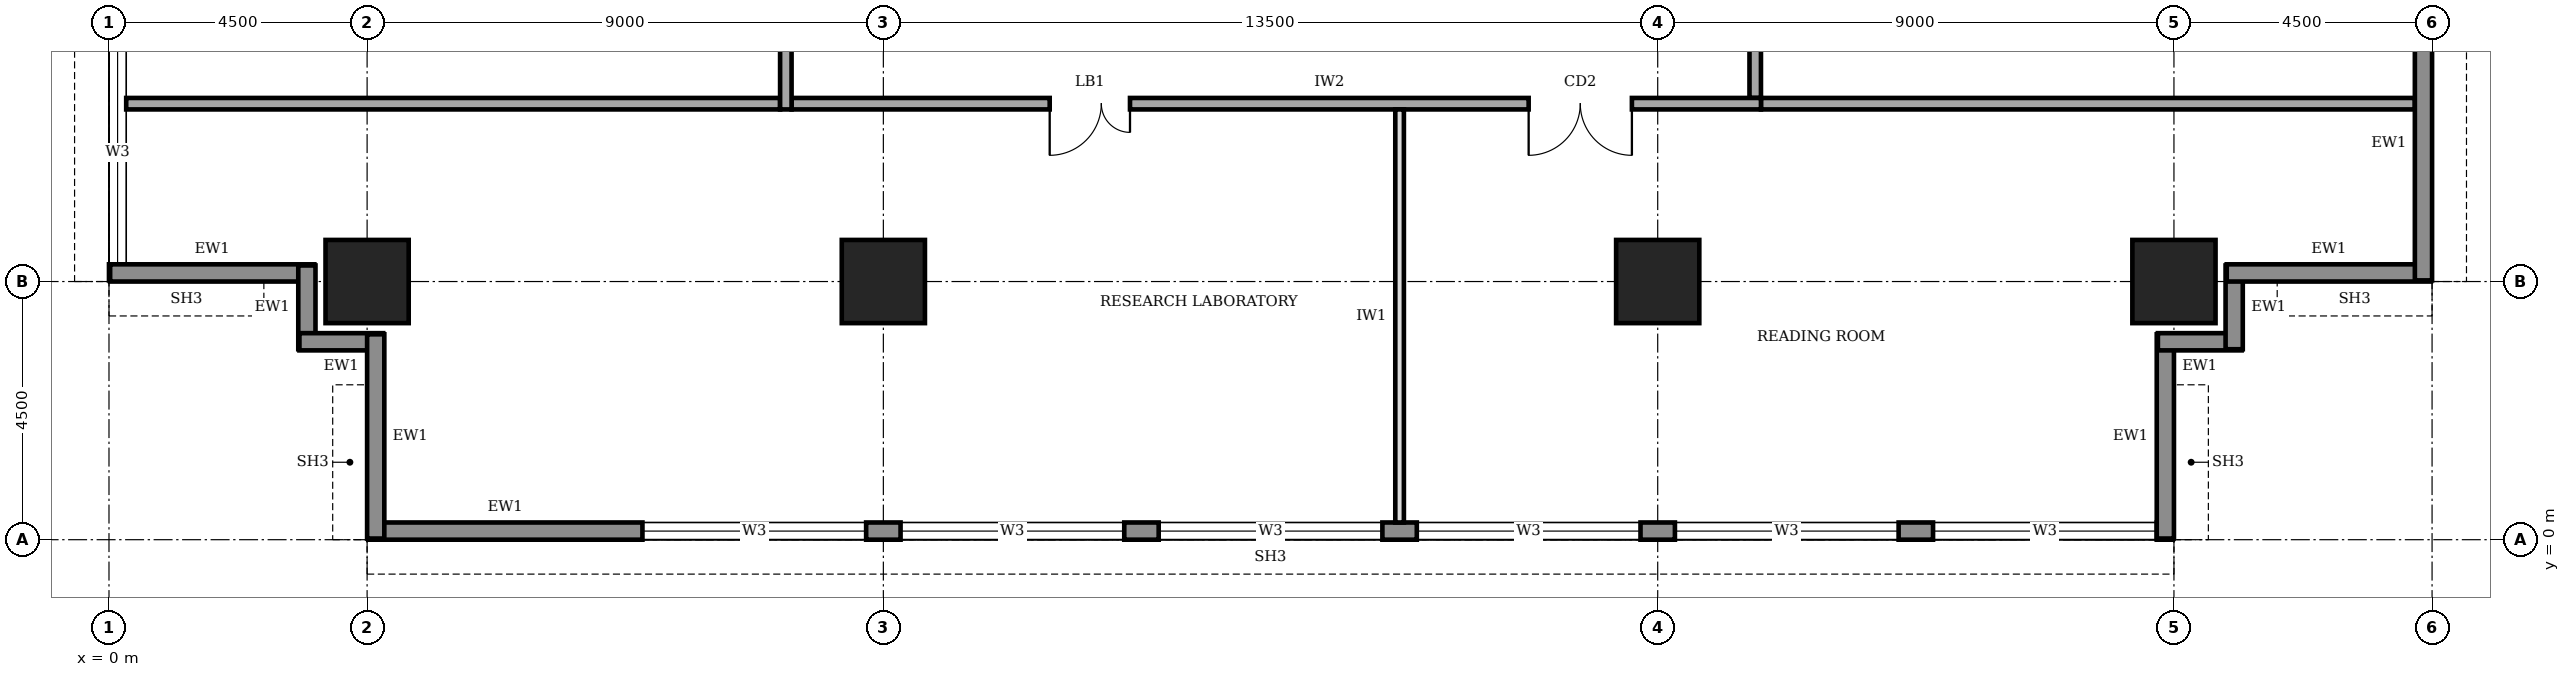
"""IFC4 building model, lengths in metres.
Left out: names, types, materials, properties, quantities, classifications, styles, units other than length and angle.
Written with IfcOpenShell. Run it as: python <this file> out.ifc"""

import sys

from ifc_helpers import new_model, si_unit, direction, frame, frame_2d, origin, origin_2d, place, context, subcontext, project, spatial, rectangle, extrude, element, fill, save


model = new_model("IFC4")
c1 = context("Model", 3, precision=1e-05, world=origin(), true_north=direction((0.0, 1.0)))
c2 = subcontext(c1, "Body", "Model", "MODEL_VIEW")
j1 = project(units=[si_unit("LENGTHUNIT", "METRE"), si_unit("PLANEANGLEUNIT", "RADIAN")], contexts=[c1])
p1 = place(None, origin())
s1 = spatial("IfcSite", under=j1, at=p1, CompositionType="ELEMENT")
p2 = place(p1, origin())
s2 = spatial("IfcBuilding", under=s1, at=p2, CompositionType="ELEMENT")
p3 = place(p2, frame((0.0, 0.0, 265.0)))
s3 = spatial("IfcBuildingStorey", under=s2, at=p3, CompositionType="ELEMENT", Elevation=265.0)
for number, where, z_axis, x_axis in (
    (1, (4.5, 4.5, 0.0), (0.0, 0.0, 1.0), (1.0, 0.0, 0.0)),
    (2, (13.5, 4.5, 0.0), (0.0, 0.0, 1.0), (1.0, 0.0, 0.0)),
    (3, (27.0, 4.5, 0.0), (0.0, 0.0, 1.0), (1.0, 0.0, 0.0)),
    (4, (36.0, 4.5, 0.0), (0.0, 0.0, 1.0), (1.0, 0.0, 0.0)),
):
    element("IfcColumn", number, at=place(p3, frame(where, z_axis=z_axis, x_axis=x_axis)), inside=s3, PredefinedType="COLUMN", context=c2, shape_type="SweptSolid", body=[
        extrude(rectangle(XDim=1.45, YDim=1.45, at=origin_2d()), origin(), (0.0, 0.0, 1.0), 4.0),
    ])
p4 = place(p3, frame((4.52, 0.15, 0.0), z_axis=(0.0, 0.0, 1.0), x_axis=(1.0, 0.0, 0.0)))
e5 = element("IfcWall", 5, at=p4, inside=s3, PredefinedType="STANDARD", context=c2, shape_type="SweptSolid", body=[
    extrude(rectangle(XDim=31.46, YDim=0.3, at=frame_2d((15.73, 0.0))), origin(), (0.0, 0.0, 1.0), 3.75),
])
p5 = place(p4, frame((4.78, 0.0, 0.95)))
e6 = element("IfcOpeningElement", 6, at=p5, cuts=e5, PredefinedType="OPENING", context=c2, shape_type="SweptSolid", body=[
    extrude(rectangle(XDim=3.9, YDim=1.8, at=frame_2d((1.95, 0.9))), frame((0.0, 0.16, 0.0), z_axis=(0.0, -1.0, 0.0), x_axis=(1.0, 0.0, 0.0)), (0.0, 0.0, 1.0), 0.32),
])
p6 = place(p4, frame((9.28, 0.0, 0.95)))
e7 = element("IfcOpeningElement", 7, at=p6, cuts=e5, PredefinedType="OPENING", context=c2, shape_type="SweptSolid", body=[
    extrude(rectangle(XDim=3.9, YDim=1.8, at=frame_2d((1.95, 0.9))), frame((0.0, 0.16, 0.0), z_axis=(0.0, -1.0, 0.0), x_axis=(1.0, 0.0, 0.0)), (0.0, 0.0, 1.0), 0.32),
])
p7 = place(p4, frame((13.78, 0.0, 0.95)))
e8 = element("IfcOpeningElement", 8, at=p7, cuts=e5, PredefinedType="OPENING", context=c2, shape_type="SweptSolid", body=[
    extrude(rectangle(XDim=3.9, YDim=1.8, at=frame_2d((1.95, 0.9))), frame((0.0, 0.16, 0.0), z_axis=(0.0, -1.0, 0.0), x_axis=(1.0, 0.0, 0.0)), (0.0, 0.0, 1.0), 0.32),
])
p8 = place(p4, frame((18.28, 0.0, 0.95)))
e9 = element("IfcOpeningElement", 9, at=p8, cuts=e5, PredefinedType="OPENING", context=c2, shape_type="SweptSolid", body=[
    extrude(rectangle(XDim=3.9, YDim=1.8, at=frame_2d((1.95, 0.9))), frame((0.0, 0.16, 0.0), z_axis=(0.0, -1.0, 0.0), x_axis=(1.0, 0.0, 0.0)), (0.0, 0.0, 1.0), 0.32),
])
p9 = place(p4, frame((22.78, 0.0, 0.95)))
e10 = element("IfcOpeningElement", 10, at=p9, cuts=e5, PredefinedType="OPENING", context=c2, shape_type="SweptSolid", body=[
    extrude(rectangle(XDim=3.9, YDim=1.8, at=frame_2d((1.95, 0.9))), frame((0.0, 0.16, 0.0), z_axis=(0.0, -1.0, 0.0), x_axis=(1.0, 0.0, 0.0)), (0.0, 0.0, 1.0), 0.32),
])
p10 = place(p4, frame((27.28, 0.0, 0.95)))
e11 = element("IfcOpeningElement", 11, at=p10, cuts=e5, PredefinedType="OPENING", context=c2, shape_type="SweptSolid", body=[
    extrude(rectangle(XDim=3.9, YDim=1.8, at=frame_2d((1.95, 0.9))), frame((0.0, 0.16, 0.0), z_axis=(0.0, -1.0, 0.0), x_axis=(1.0, 0.0, 0.0)), (0.0, 0.0, 1.0), 0.32),
])
p11 = place(p3, frame((35.85, 0.02, 0.0), z_axis=(0.0, 0.0, 1.0), x_axis=(0.0, 1.0, 0.0)))
e12 = element("IfcWall", 12, at=p11, inside=s3, PredefinedType="STANDARD", context=c2, shape_type="SweptSolid", body=[
    extrude(rectangle(XDim=3.56, YDim=0.3, at=frame_2d((1.78, 0.0))), origin(), (0.0, 0.0, 1.0), 2.85),
])
for number, where, z_axis, x_axis in (
    (13, (35.72, 3.45, 0.0), (0.0, 0.0, 1.0), (1.0, 0.0, 0.0)),
    (14, (37.05, 3.32, 0.0), (0.0, 0.0, 1.0), (0.0, 1.0, 0.0)),
):
    element("IfcWall", number, at=place(p3, frame(where, z_axis=z_axis, x_axis=x_axis)), inside=s3, PredefinedType="STANDARD", context=c2, shape_type="SweptSolid", body=[
        extrude(rectangle(XDim=1.46, YDim=0.3, at=frame_2d((0.73, 0.0))), origin(), (0.0, 0.0, 1.0), 3.75),
    ])
p12 = place(p3, frame((36.92, 4.65, 0.0), z_axis=(0.0, 0.0, 1.0), x_axis=(1.0, 0.0, 0.0)))
e15 = element("IfcWall", 15, at=p12, inside=s3, PredefinedType="STANDARD", context=c2, shape_type="SweptSolid", body=[
    extrude(rectangle(XDim=3.56, YDim=0.3, at=frame_2d((1.78, 0.0))), origin(), (0.0, 0.0, 1.0), 2.85),
])
p13 = place(p3, frame((40.35, 4.52, 0.0), z_axis=(0.0, 0.0, 1.0), x_axis=(0.0, 1.0, 0.0)))
e16 = element("IfcWall", 16, at=p13, inside=s3, PredefinedType="STANDARD", context=c2, shape_type="SweptSolid", body=[
    extrude(rectangle(XDim=31.46, YDim=0.3, at=frame_2d((15.73, 0.0))), origin(), (0.0, 0.0, 1.0), 3.75),
])
p14 = place(p13, frame((4.78, 0.0, 0.95)))
e17 = element("IfcOpeningElement", 17, at=p14, cuts=e16, PredefinedType="OPENING", context=c2, shape_type="SweptSolid", body=[
    extrude(rectangle(XDim=3.9, YDim=1.8, at=frame_2d((1.95, 0.9))), frame((0.0, 0.16, 0.0), z_axis=(0.0, -1.0, 0.0), x_axis=(1.0, 0.0, 0.0)), (0.0, 0.0, 1.0), 0.32),
])
p15 = place(p13, frame((9.28, 0.0, 0.95)))
e18 = element("IfcOpeningElement", 18, at=p15, cuts=e16, PredefinedType="OPENING", context=c2, shape_type="SweptSolid", body=[
    extrude(rectangle(XDim=3.9, YDim=1.8, at=frame_2d((1.95, 0.9))), frame((0.0, 0.16, 0.0), z_axis=(0.0, -1.0, 0.0), x_axis=(1.0, 0.0, 0.0)), (0.0, 0.0, 1.0), 0.32),
])
p16 = place(p13, frame((13.78, 0.0, 0.95)))
e19 = element("IfcOpeningElement", 19, at=p16, cuts=e16, PredefinedType="OPENING", context=c2, shape_type="SweptSolid", body=[
    extrude(rectangle(XDim=3.9, YDim=1.8, at=frame_2d((1.95, 0.9))), frame((0.0, 0.16, 0.0), z_axis=(0.0, -1.0, 0.0), x_axis=(1.0, 0.0, 0.0)), (0.0, 0.0, 1.0), 0.32),
])
p17 = place(p13, frame((18.28, 0.0, 0.95)))
e20 = element("IfcOpeningElement", 20, at=p17, cuts=e16, PredefinedType="OPENING", context=c2, shape_type="SweptSolid", body=[
    extrude(rectangle(XDim=3.9, YDim=1.8, at=frame_2d((1.95, 0.9))), frame((0.0, 0.16, 0.0), z_axis=(0.0, -1.0, 0.0), x_axis=(1.0, 0.0, 0.0)), (0.0, 0.0, 1.0), 0.32),
])
p18 = place(p13, frame((22.78, 0.0, 0.95)))
e21 = element("IfcOpeningElement", 21, at=p18, cuts=e16, PredefinedType="OPENING", context=c2, shape_type="SweptSolid", body=[
    extrude(rectangle(XDim=3.9, YDim=1.8, at=frame_2d((1.95, 0.9))), frame((0.0, 0.16, 0.0), z_axis=(0.0, -1.0, 0.0), x_axis=(1.0, 0.0, 0.0)), (0.0, 0.0, 1.0), 0.32),
])
p19 = place(p13, frame((27.28, 0.0, 0.95)))
e22 = element("IfcOpeningElement", 22, at=p19, cuts=e16, PredefinedType="OPENING", context=c2, shape_type="SweptSolid", body=[
    extrude(rectangle(XDim=3.9, YDim=1.8, at=frame_2d((1.95, 0.9))), frame((0.0, 0.16, 0.0), z_axis=(0.0, -1.0, 0.0), x_axis=(1.0, 0.0, 0.0)), (0.0, 0.0, 1.0), 0.32),
])
p20 = place(p3, frame((0.15, 35.98, 0.0), z_axis=(0.0, 0.0, 1.0), x_axis=(0.0, -1.0, 0.0)))
e23 = element("IfcWall", 23, at=p20, inside=s3, PredefinedType="STANDARD", context=c2, shape_type="SweptSolid", body=[
    extrude(rectangle(XDim=31.46, YDim=0.3, at=frame_2d((15.73, 0.0))), origin(), (0.0, 0.0, 1.0), 3.75),
])
p21 = place(p20, frame((27.28, 0.0, 0.95)))
e24 = element("IfcOpeningElement", 24, at=p21, cuts=e23, PredefinedType="OPENING", context=c2, shape_type="SweptSolid", body=[
    extrude(rectangle(XDim=3.9, YDim=1.8, at=frame_2d((1.95, 0.9))), frame((0.0, 0.16, 0.0), z_axis=(0.0, -1.0, 0.0), x_axis=(1.0, 0.0, 0.0)), (0.0, 0.0, 1.0), 0.32),
])
p22 = place(p20, frame((22.78, 0.0, 0.95)))
e25 = element("IfcOpeningElement", 25, at=p22, cuts=e23, PredefinedType="OPENING", context=c2, shape_type="SweptSolid", body=[
    extrude(rectangle(XDim=3.9, YDim=1.8, at=frame_2d((1.95, 0.9))), frame((0.0, 0.16, 0.0), z_axis=(0.0, -1.0, 0.0), x_axis=(1.0, 0.0, 0.0)), (0.0, 0.0, 1.0), 0.32),
])
p23 = place(p20, frame((18.28, 0.0, 0.95)))
e26 = element("IfcOpeningElement", 26, at=p23, cuts=e23, PredefinedType="OPENING", context=c2, shape_type="SweptSolid", body=[
    extrude(rectangle(XDim=3.9, YDim=1.8, at=frame_2d((1.95, 0.9))), frame((0.0, 0.16, 0.0), z_axis=(0.0, -1.0, 0.0), x_axis=(1.0, 0.0, 0.0)), (0.0, 0.0, 1.0), 0.32),
])
p24 = place(p20, frame((13.78, 0.0, 0.95)))
e27 = element("IfcOpeningElement", 27, at=p24, cuts=e23, PredefinedType="OPENING", context=c2, shape_type="SweptSolid", body=[
    extrude(rectangle(XDim=3.9, YDim=1.8, at=frame_2d((1.95, 0.9))), frame((0.0, 0.16, 0.0), z_axis=(0.0, -1.0, 0.0), x_axis=(1.0, 0.0, 0.0)), (0.0, 0.0, 1.0), 0.32),
])
p25 = place(p20, frame((9.28, 0.0, 0.95)))
e28 = element("IfcOpeningElement", 28, at=p25, cuts=e23, PredefinedType="OPENING", context=c2, shape_type="SweptSolid", body=[
    extrude(rectangle(XDim=3.9, YDim=1.8, at=frame_2d((1.95, 0.9))), frame((0.0, 0.16, 0.0), z_axis=(0.0, -1.0, 0.0), x_axis=(1.0, 0.0, 0.0)), (0.0, 0.0, 1.0), 0.32),
])
p26 = place(p20, frame((4.78, 0.0, 0.95)))
e29 = element("IfcOpeningElement", 29, at=p26, cuts=e23, PredefinedType="OPENING", context=c2, shape_type="SweptSolid", body=[
    extrude(rectangle(XDim=3.9, YDim=1.8, at=frame_2d((1.95, 0.9))), frame((0.0, 0.16, 0.0), z_axis=(0.0, -1.0, 0.0), x_axis=(1.0, 0.0, 0.0)), (0.0, 0.0, 1.0), 0.32),
])
p27 = place(p3, frame((0.02, 4.65, 0.0), z_axis=(0.0, 0.0, 1.0), x_axis=(1.0, 0.0, 0.0)))
e30 = element("IfcWall", 30, at=p27, inside=s3, PredefinedType="STANDARD", context=c2, shape_type="SweptSolid", body=[
    extrude(rectangle(XDim=3.56, YDim=0.3, at=frame_2d((1.78, 0.0))), origin(), (0.0, 0.0, 1.0), 2.85),
])
for number, where, z_axis, x_axis in (
    (31, (3.45, 4.78, 0.0), (0.0, 0.0, 1.0), (0.0, -1.0, 0.0)),
    (32, (3.32, 3.45, 0.0), (0.0, 0.0, 1.0), (1.0, 0.0, 0.0)),
):
    element("IfcWall", number, at=place(p3, frame(where, z_axis=z_axis, x_axis=x_axis)), inside=s3, PredefinedType="STANDARD", context=c2, shape_type="SweptSolid", body=[
        extrude(rectangle(XDim=1.46, YDim=0.3, at=frame_2d((0.73, 0.0))), origin(), (0.0, 0.0, 1.0), 3.75),
    ])
p28 = place(p3, frame((4.65, 3.58, 0.0), z_axis=(0.0, 0.0, 1.0), x_axis=(0.0, -1.0, 0.0)))
e33 = element("IfcWall", 33, at=p28, inside=s3, PredefinedType="STANDARD", context=c2, shape_type="SweptSolid", body=[
    extrude(rectangle(XDim=3.56, YDim=0.3, at=frame_2d((1.78, 0.0))), origin(), (0.0, 0.0, 1.0), 2.85),
])
p29 = place(p3, frame((11.9, 7.6, 0.0), z_axis=(0.0, 0.0, 1.0), x_axis=(1.0, 0.0, 0.0)))
e34 = element("IfcWall", 34, at=p29, inside=s3, PredefinedType="SOLIDWALL", context=c2, shape_type="SweptSolid", body=[
    extrude(rectangle(XDim=16.9, YDim=0.2, at=frame_2d((8.45, 0.0))), origin(), (0.0, 0.0, 1.0), 3.75),
])
p30 = place(p29, frame((4.5, 0.0, 0.0)))
e35 = element("IfcOpeningElement", 35, at=p30, cuts=e34, PredefinedType="OPENING", context=c2, shape_type="SweptSolid", body=[
    extrude(rectangle(XDim=1.4, YDim=2.1, at=frame_2d((0.7, 1.05))), frame((0.0, 0.11, 0.0), z_axis=(0.0, -1.0, 0.0), x_axis=(1.0, 0.0, 0.0)), (0.0, 0.0, 1.0), 0.22),
])
p31 = place(p29, frame((12.85, 0.0, 0.0)))
e36 = element("IfcOpeningElement", 36, at=p31, cuts=e34, PredefinedType="OPENING", context=c2, shape_type="SweptSolid", body=[
    extrude(rectangle(XDim=1.8, YDim=2.1, at=frame_2d((0.9, 1.05))), frame((0.0, 0.11, 0.0), z_axis=(0.0, -1.0, 0.0), x_axis=(1.0, 0.0, 0.0)), (0.0, 0.0, 1.0), 0.22),
])
p32 = place(p3, frame((28.7, 7.7, 0.0), z_axis=(0.0, 0.0, 1.0), x_axis=(0.0, 1.0, 0.0)))
e37 = element("IfcWall", 37, at=p32, inside=s3, PredefinedType="SOLIDWALL", context=c2, shape_type="SweptSolid", body=[
    extrude(rectangle(XDim=23.8, YDim=0.2, at=frame_2d((11.9, 0.0))), origin(), (0.0, 0.0, 1.0), 3.75),
])
p33 = place(p32, frame((4.15, 0.0, 0.0)))
e38 = element("IfcOpeningElement", 38, at=p33, cuts=e37, PredefinedType="OPENING", context=c2, shape_type="SweptSolid", body=[
    extrude(rectangle(XDim=1.8, YDim=2.1, at=frame_2d((0.9, 1.05))), frame((0.0, 0.11, 0.0), z_axis=(0.0, -1.0, 0.0), x_axis=(1.0, 0.0, 0.0)), (0.0, 0.0, 1.0), 0.22),
])
p34 = place(p32, frame((16.35, 0.0, 0.0)))
e39 = element("IfcOpeningElement", 39, at=p34, cuts=e37, PredefinedType="OPENING", context=c2, shape_type="SweptSolid", body=[
    extrude(rectangle(XDim=1.4, YDim=2.1, at=frame_2d((0.7, 1.05))), frame((0.0, 0.11, 0.0), z_axis=(0.0, -1.0, 0.0), x_axis=(1.0, 0.0, 0.0)), (0.0, 0.0, 1.0), 0.22),
])
p35 = place(p3, frame((11.8, 31.3, 0.0), z_axis=(0.0, 0.0, 1.0), x_axis=(0.0, -1.0, 0.0)))
e40 = element("IfcWall", 40, at=p35, inside=s3, PredefinedType="SOLIDWALL", context=c2, shape_type="SweptSolid", body=[
    extrude(rectangle(XDim=23.8, YDim=0.2, at=frame_2d((11.9, 0.0))), origin(), (0.0, 0.0, 1.0), 3.75),
])
p36 = place(p35, frame((20.3, 0.0, 0.0)))
e41 = element("IfcOpeningElement", 41, at=p36, cuts=e40, PredefinedType="OPENING", context=c2, shape_type="SweptSolid", body=[
    extrude(rectangle(XDim=1.0, YDim=2.1, at=frame_2d((0.5, 1.05))), frame((0.0, 0.11, 0.0), z_axis=(0.0, -1.0, 0.0), x_axis=(1.0, 0.0, 0.0)), (0.0, 0.0, 1.0), 0.22),
])
p37 = place(p35, frame((16.2, 0.0, 0.0)))
e42 = element("IfcOpeningElement", 42, at=p37, cuts=e40, PredefinedType="OPENING", context=c2, shape_type="SweptSolid", body=[
    extrude(rectangle(XDim=1.0, YDim=2.1, at=frame_2d((0.5, 1.05))), frame((0.0, 0.11, 0.0), z_axis=(0.0, -1.0, 0.0), x_axis=(1.0, 0.0, 0.0)), (0.0, 0.0, 1.0), 0.22),
])
p38 = place(p35, frame((13.2, 0.0, 0.0)))
e43 = element("IfcOpeningElement", 43, at=p38, cuts=e40, PredefinedType="OPENING", context=c2, shape_type="SweptSolid", body=[
    extrude(rectangle(XDim=0.9, YDim=2.1, at=frame_2d((0.45, 1.05))), frame((0.0, 0.11, 0.0), z_axis=(0.0, -1.0, 0.0), x_axis=(1.0, 0.0, 0.0)), (0.0, 0.0, 1.0), 0.22),
])
p39 = place(p35, frame((10.15, 0.0, 0.0)))
e44 = element("IfcOpeningElement", 44, at=p39, cuts=e40, PredefinedType="OPENING", context=c2, shape_type="SweptSolid", body=[
    extrude(rectangle(XDim=0.9, YDim=2.1, at=frame_2d((0.45, 1.05))), frame((0.0, 0.11, 0.0), z_axis=(0.0, -1.0, 0.0), x_axis=(1.0, 0.0, 0.0)), (0.0, 0.0, 1.0), 0.22),
])
p40 = place(p35, frame((5.45, 0.0, 0.0)))
e45 = element("IfcOpeningElement", 45, at=p40, cuts=e40, PredefinedType="OPENING", context=c2, shape_type="SweptSolid", body=[
    extrude(rectangle(XDim=0.9, YDim=2.1, at=frame_2d((0.45, 1.05))), frame((0.0, 0.11, 0.0), z_axis=(0.0, -1.0, 0.0), x_axis=(1.0, 0.0, 0.0)), (0.0, 0.0, 1.0), 0.22),
])
p41 = place(p35, frame((8.0, 0.0, 0.0)))
e46 = element("IfcOpeningElement", 46, at=p41, cuts=e40, PredefinedType="OPENING", context=c2, shape_type="SweptSolid", body=[
    extrude(rectangle(XDim=1.0, YDim=2.1, at=frame_2d((0.5, 1.05))), frame((0.0, 0.11, 0.0), z_axis=(0.0, -1.0, 0.0), x_axis=(1.0, 0.0, 0.0)), (0.0, 0.0, 1.0), 0.22),
])
p42 = place(p35, frame((1.55, 0.0, 0.0)))
e47 = element("IfcOpeningElement", 47, at=p42, cuts=e40, PredefinedType="OPENING", context=c2, shape_type="SweptSolid", body=[
    extrude(rectangle(XDim=1.0, YDim=2.1, at=frame_2d((0.5, 1.05))), frame((0.0, 0.11, 0.0), z_axis=(0.0, -1.0, 0.0), x_axis=(1.0, 0.0, 0.0)), (0.0, 0.0, 1.0), 0.22),
])
for number, where, z_axis, x_axis in (
    (48, (0.3, 7.6, 0.0), (0.0, 0.0, 1.0), (1.0, 0.0, 0.0)),
    (49, (28.8, 7.6, 0.0), (0.0, 0.0, 1.0), (1.0, 0.0, 0.0)),
):
    element("IfcWall", number, at=place(p3, frame(where, z_axis=z_axis, x_axis=x_axis)), inside=s3, PredefinedType="SOLIDWALL", context=c2, shape_type="SweptSolid", body=[
        extrude(rectangle(XDim=11.4, YDim=0.2, at=frame_2d((5.7, 0.0))), origin(), (0.0, 0.0, 1.0), 3.75),
    ])
p43 = place(p3, frame((22.5, 0.3, 0.0), z_axis=(0.0, 0.0, 1.0), x_axis=(0.0, 1.0, 0.0)))
e50 = element("IfcWall", 50, at=p43, inside=s3, PredefinedType="PARTITIONING", context=c2, shape_type="SweptSolid", body=[
    extrude(rectangle(XDim=7.2, YDim=0.15, at=frame_2d((3.6, 0.0))), origin(), (0.0, 0.0, 1.0), 3.75),
])
p44 = place(p5, origin())
e51 = element("IfcWindow", 51, at=p44, inside=s3, PartitioningType="SINGLE_PANEL", PredefinedType="WINDOW", context=c2, shape_type="SweptSolid", body=[
    extrude(rectangle(XDim=3.9, YDim=1.8, at=frame_2d((1.95, 0.9))), frame((0.0, 0.03, 0.0), z_axis=(0.0, -1.0, 0.0), x_axis=(1.0, 0.0, 0.0)), (0.0, 0.0, 1.0), 0.06),
])
fill(e6, e51)
p45 = place(p6, origin())
e52 = element("IfcWindow", 52, at=p45, inside=s3, PartitioningType="SINGLE_PANEL", PredefinedType="WINDOW", context=c2, shape_type="SweptSolid", body=[
    extrude(rectangle(XDim=3.9, YDim=1.8, at=frame_2d((1.95, 0.9))), frame((0.0, 0.03, 0.0), z_axis=(0.0, -1.0, 0.0), x_axis=(1.0, 0.0, 0.0)), (0.0, 0.0, 1.0), 0.06),
])
fill(e7, e52)
p46 = place(p7, origin())
e53 = element("IfcWindow", 53, at=p46, inside=s3, PartitioningType="SINGLE_PANEL", PredefinedType="WINDOW", context=c2, shape_type="SweptSolid", body=[
    extrude(rectangle(XDim=3.9, YDim=1.8, at=frame_2d((1.95, 0.9))), frame((0.0, 0.03, 0.0), z_axis=(0.0, -1.0, 0.0), x_axis=(1.0, 0.0, 0.0)), (0.0, 0.0, 1.0), 0.06),
])
fill(e8, e53)
p47 = place(p8, origin())
e54 = element("IfcWindow", 54, at=p47, inside=s3, PartitioningType="SINGLE_PANEL", PredefinedType="WINDOW", context=c2, shape_type="SweptSolid", body=[
    extrude(rectangle(XDim=3.9, YDim=1.8, at=frame_2d((1.95, 0.9))), frame((0.0, 0.03, 0.0), z_axis=(0.0, -1.0, 0.0), x_axis=(1.0, 0.0, 0.0)), (0.0, 0.0, 1.0), 0.06),
])
fill(e9, e54)
p48 = place(p9, origin())
e55 = element("IfcWindow", 55, at=p48, inside=s3, PartitioningType="SINGLE_PANEL", PredefinedType="WINDOW", context=c2, shape_type="SweptSolid", body=[
    extrude(rectangle(XDim=3.9, YDim=1.8, at=frame_2d((1.95, 0.9))), frame((0.0, 0.03, 0.0), z_axis=(0.0, -1.0, 0.0), x_axis=(1.0, 0.0, 0.0)), (0.0, 0.0, 1.0), 0.06),
])
fill(e10, e55)
p49 = place(p10, origin())
e56 = element("IfcWindow", 56, at=p49, inside=s3, PartitioningType="SINGLE_PANEL", PredefinedType="WINDOW", context=c2, shape_type="SweptSolid", body=[
    extrude(rectangle(XDim=3.9, YDim=1.8, at=frame_2d((1.95, 0.9))), frame((0.0, 0.03, 0.0), z_axis=(0.0, -1.0, 0.0), x_axis=(1.0, 0.0, 0.0)), (0.0, 0.0, 1.0), 0.06),
])
fill(e11, e56)
p50 = place(p21, origin())
e57 = element("IfcWindow", 57, at=p50, inside=s3, PartitioningType="SINGLE_PANEL", PredefinedType="WINDOW", context=c2, shape_type="SweptSolid", body=[
    extrude(rectangle(XDim=3.9, YDim=1.8, at=frame_2d((1.95, 0.9))), frame((0.0, 0.03, 0.0), z_axis=(0.0, -1.0, 0.0), x_axis=(1.0, 0.0, 0.0)), (0.0, 0.0, 1.0), 0.06),
])
fill(e24, e57)
p51 = place(p30, frame((1.4, 0.0, 0.0), z_axis=(0.0, 0.0, 1.0), x_axis=(-1.0, 0.0, 0.0)))
e58 = element("IfcDoor", 58, at=p51, inside=s3, OperationType="DOUBLE_DOOR_SINGLE_SWING", PredefinedType="DOOR", context=c2, shape_type="SweptSolid", body=[
    extrude(rectangle(XDim=1.4, YDim=2.1, at=frame_2d((0.7, 1.05))), frame((0.0, 0.025, 0.0), z_axis=(0.0, -1.0, 0.0), x_axis=(1.0, 0.0, 0.0)), (0.0, 0.0, 1.0), 0.05),
])
fill(e35, e58)
p52 = place(p31, frame((1.8, 0.0, 0.0), z_axis=(0.0, 0.0, 1.0), x_axis=(-1.0, 0.0, 0.0)))
e59 = element("IfcDoor", 59, at=p52, inside=s3, OperationType="DOUBLE_DOOR_SINGLE_SWING", PredefinedType="DOOR", context=c2, shape_type="SweptSolid", body=[
    extrude(rectangle(XDim=1.8, YDim=2.1, at=frame_2d((0.9, 1.05))), frame((0.0, 0.025, 0.0), z_axis=(0.0, -1.0, 0.0), x_axis=(1.0, 0.0, 0.0)), (0.0, 0.0, 1.0), 0.05),
])
fill(e36, e59)
save(model, sys.argv[1])
